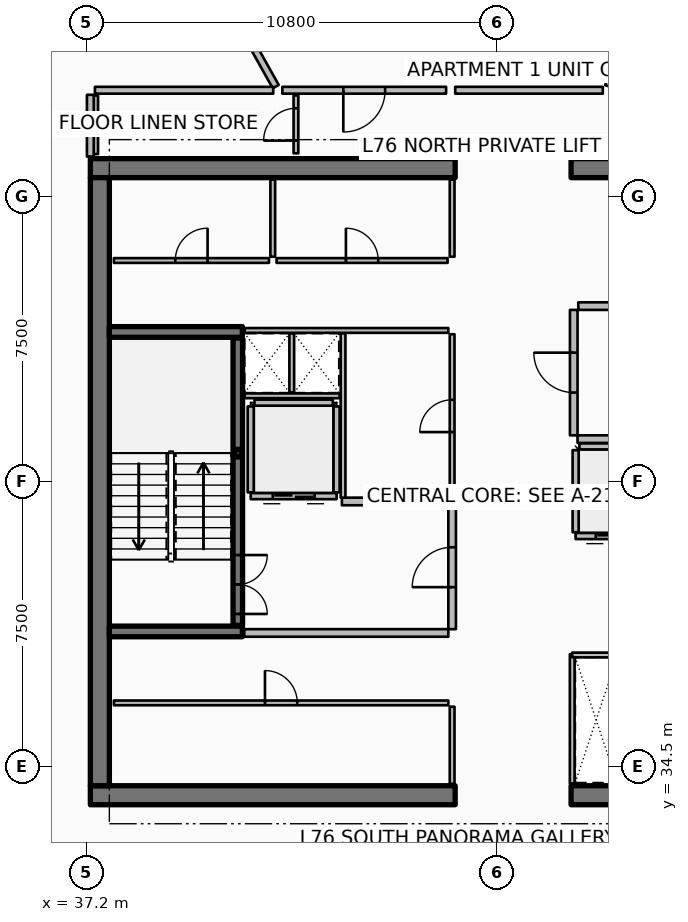
"""IFC4 building model, lengths in metres.
Left out: names, types, materials, properties, quantities, classifications, styles, units other than length and angle.
Written with IfcOpenShell. Run it as: python <this file> out.ifc"""

import sys

from ifc_helpers import new_model, si_unit, direction, frame, frame_2d, origin, origin_2d, place, context, subcontext, project, spatial, rectangle, hollow_rectangle, extrude, element, fill, save


model = new_model("IFC4")
c1 = context("Model", 3, precision=1e-05, world=origin(), true_north=direction((0.0, 1.0)))
c2 = subcontext(c1, "Body", "Model", "MODEL_VIEW")
j1 = project(units=[si_unit("LENGTHUNIT", "METRE"), si_unit("PLANEANGLEUNIT", "RADIAN")], contexts=[c1])
p1 = place(None, origin())
s1 = spatial("IfcSite", under=j1, at=p1, CompositionType="ELEMENT")
p2 = place(p1, origin())
s2 = spatial("IfcBuilding", under=s1, at=p2, CompositionType="ELEMENT")
p3 = place(p2, frame((0.0, 0.0, 302.15)))
s3 = spatial("IfcBuildingStorey", under=s2, at=p3, CompositionType="ELEMENT", Elevation=302.15)
p4 = place(p3, frame((37.3, 33.75, 0.0), z_axis=(0.0, 0.0, 1.0), x_axis=(1.0, 0.0, 0.0)))
e1 = element("IfcWall", 1, at=p4, inside=s3, PredefinedType="SHEAR", context=c2, shape_type="SweptSolid", body=[
    extrude(rectangle(XDim=9.6, YDim=0.5, at=frame_2d((4.8, 0.0))), origin(), (0.0, 0.0, 1.0), 3.85),
])
p5 = place(p3, frame((49.95, 33.75, 0.0), z_axis=(0.0, 0.0, 1.0), x_axis=(1.0, 0.0, 0.0)))
e2 = element("IfcWall", 2, at=p5, inside=s3, PredefinedType="SHEAR", context=c2, shape_type="SweptSolid", body=[
    extrude(rectangle(XDim=9.6, YDim=0.5, at=frame_2d((4.8, 0.0))), origin(), (0.0, 0.0, 1.0), 3.85),
])
p6 = place(p3, frame((37.3, 50.25, 0.0), z_axis=(0.0, 0.0, 1.0), x_axis=(1.0, 0.0, 0.0)))
e3 = element("IfcWall", 3, at=p6, inside=s3, PredefinedType="SHEAR", context=c2, shape_type="SweptSolid", body=[
    extrude(rectangle(XDim=9.6, YDim=0.5, at=frame_2d((4.8, 0.0))), origin(), (0.0, 0.0, 1.0), 3.85),
])
p7 = place(p3, frame((49.95, 50.25, 0.0), z_axis=(0.0, 0.0, 1.0), x_axis=(1.0, 0.0, 0.0)))
e4 = element("IfcWall", 4, at=p7, inside=s3, PredefinedType="SHEAR", context=c2, shape_type="SweptSolid", body=[
    extrude(rectangle(XDim=9.6, YDim=0.5, at=frame_2d((4.8, 0.0))), origin(), (0.0, 0.0, 1.0), 3.85),
])
p8 = place(p3, frame((37.55, 34.0, 0.0), z_axis=(0.0, 0.0, 1.0), x_axis=(0.0, 1.0, 0.0)))
e5 = element("IfcWall", 5, at=p8, inside=s3, PredefinedType="SHEAR", context=c2, shape_type="SweptSolid", body=[
    extrude(rectangle(XDim=16.0, YDim=0.5, at=frame_2d((8.0, 0.0))), origin(), (0.0, 0.0, 1.0), 3.85),
])
for number, where, z_axis, x_axis in (
    (6, (37.8, 38.06, 0.0), (0.0, 0.0, 1.0), (1.0, 0.0, 0.0)),
    (7, (37.8, 45.94, 0.0), (0.0, 0.0, 1.0), (1.0, 0.0, 0.0)),
):
    element("IfcWall", number, at=place(p3, frame(where, z_axis=z_axis, x_axis=x_axis)), inside=s3, PredefinedType="SHEAR", context=c2, shape_type="SweptSolid", body=[
        extrude(rectangle(XDim=3.5, YDim=0.28, at=frame_2d((1.75, 0.0))), origin(), (0.0, 0.0, 1.0), 3.85),
    ])
p9 = place(p3, frame((41.18, 42.75, 0.0), z_axis=(0.0, 0.0, 1.0), x_axis=(1.0, 0.0, 0.0)))
e8 = element("IfcColumn", 8, at=p9, inside=s3, PredefinedType="COLUMN", context=c2, shape_type="SweptSolid", body=[
    extrude(hollow_rectangle(XDim=0.2, YDim=0.2, WallThickness=0.01, InnerFilletRadius=0.01, OuterFilletRadius=0.02, at=origin_2d()), origin(), (0.0, 0.0, 1.0), 1.72),
])
p10 = place(p3, frame((41.18, 38.22, 0.0), z_axis=(0.0, 0.0, 1.0), x_axis=(0.0, 1.0, 0.0)))
e9 = element("IfcWall", 9, at=p10, inside=s3, PredefinedType="SOLIDWALL", context=c2, shape_type="SweptSolid", body=[
    extrude(rectangle(XDim=7.56, YDim=0.25, at=frame_2d((3.78, 0.0))), origin(), (0.0, 0.0, 1.0), 3.45),
])
p11 = place(p10, frame((0.3, 0.0, 0.0)))
e10 = element("IfcOpeningElement", 10, at=p11, cuts=e9, PredefinedType="OPENING", context=c2, shape_type="SweptSolid", body=[
    extrude(rectangle(XDim=1.55, YDim=2.15, at=frame_2d((0.775, 1.075))), frame((0.0, 0.135, 0.0), z_axis=(0.0, -1.0, 0.0), x_axis=(1.0, 0.0, 0.0)), (0.0, 0.0, 1.0), 0.27),
])
p12 = place(p3, frame((43.78, 41.62, 0.0), z_axis=(0.0, 0.0, 1.0), x_axis=(-1.0, 0.0, 0.0)))
e11 = element("IfcWall", 11, at=p12, inside=s3, PredefinedType="PARTITIONING", context=c2, shape_type="SweptSolid", body=[
    extrude(rectangle(XDim=2.26, YDim=0.16, at=frame_2d((1.13, 0.0))), origin(), (0.0, 0.0, 1.0), 3.45),
])
p13 = place(p12, frame((0.58, 0.0, 0.0)))
e12 = element("IfcOpeningElement", 12, at=p13, cuts=e11, PredefinedType="OPENING", context=c2, shape_type="SweptSolid", body=[
    extrude(rectangle(XDim=1.1, YDim=2.1, at=frame_2d((0.55, 1.05))), frame((0.0, 0.09, 0.0), z_axis=(0.0, -1.0, 0.0), x_axis=(1.0, 0.0, 0.0)), (0.0, 0.0, 1.0), 0.18),
])
for number, where, z_axis, x_axis in (
    (13, (43.78, 41.72, 0.0), (0.0, 0.0, 1.0), (0.0, 1.0, 0.0)),
    (14, (41.52, 41.72, 0.0), (0.0, 0.0, 1.0), (0.0, 1.0, 0.0)),
):
    element("IfcWall", number, at=place(p3, frame(where, z_axis=z_axis, x_axis=x_axis)), inside=s3, PredefinedType="PARTITIONING", context=c2, shape_type="SweptSolid", body=[
        extrude(rectangle(XDim=2.26, YDim=0.16, at=frame_2d((1.13, 0.0))), origin(), (0.0, 0.0, 1.0), 3.45),
    ])
p14 = place(p3, frame((41.62, 44.08, 0.0), z_axis=(0.0, 0.0, 1.0), x_axis=(1.0, 0.0, 0.0)))
e15 = element("IfcWall", 15, at=p14, inside=s3, PredefinedType="PARTITIONING", context=c2, shape_type="SweptSolid", body=[
    extrude(rectangle(XDim=2.06, YDim=0.16, at=frame_2d((1.03, 0.0))), origin(), (0.0, 0.0, 1.0), 3.45),
])
p15 = place(p3, frame((52.23, 40.57, 0.0), z_axis=(0.0, 0.0, 1.0), x_axis=(-1.0, 0.0, 0.0)))
e16 = element("IfcWall", 16, at=p15, inside=s3, PredefinedType="PARTITIONING", context=c2, shape_type="SweptSolid", body=[
    extrude(rectangle(XDim=2.16, YDim=0.16, at=frame_2d((1.08, 0.0))), origin(), (0.0, 0.0, 1.0), 3.45),
])
p16 = place(p15, frame((0.53, 0.0, 0.0)))
e17 = element("IfcOpeningElement", 17, at=p16, cuts=e16, PredefinedType="OPENING", context=c2, shape_type="SweptSolid", body=[
    extrude(rectangle(XDim=1.1, YDim=2.1, at=frame_2d((0.55, 1.05))), frame((0.0, 0.09, 0.0), z_axis=(0.0, -1.0, 0.0), x_axis=(1.0, 0.0, 0.0)), (0.0, 0.0, 1.0), 0.18),
])
p17 = place(p3, frame((50.07, 40.67, 0.0), z_axis=(0.0, 0.0, 1.0), x_axis=(0.0, 1.0, 0.0)))
e18 = element("IfcWall", 18, at=p17, inside=s3, PredefinedType="PARTITIONING", context=c2, shape_type="SweptSolid", body=[
    extrude(rectangle(XDim=2.16, YDim=0.16, at=frame_2d((1.08, 0.0))), origin(), (0.0, 0.0, 1.0), 3.45),
])
p18 = place(p3, frame((50.17, 42.93, 0.0), z_axis=(0.0, 0.0, 1.0), x_axis=(1.0, 0.0, 0.0)))
e19 = element("IfcWall", 19, at=p18, inside=s3, PredefinedType="PARTITIONING", context=c2, shape_type="SweptSolid", body=[
    extrude(rectangle(XDim=1.96, YDim=0.16, at=frame_2d((0.98, 0.0))), origin(), (0.0, 0.0, 1.0), 3.45),
])
p19 = place(p3, frame((46.82, 34.05, 0.0), z_axis=(0.0, 0.0, 1.0), x_axis=(0.0, 1.0, 0.0)))
e20 = element("IfcWall", 20, at=p19, inside=s3, PredefinedType="PARTITIONING", context=c2, shape_type="SweptSolid", body=[
    extrude(rectangle(XDim=2.03, YDim=0.125, at=frame_2d((1.015, 0.0))), origin(), (0.0, 0.0, 1.0), 2.89),
])
p20 = place(p3, frame((37.92, 36.18, 0.0), z_axis=(0.0, 0.0, 1.0), x_axis=(1.0, 0.0, 0.0)))
e21 = element("IfcWall", 21, at=p20, inside=s3, PredefinedType="PARTITIONING", context=c2, shape_type="SweptSolid", body=[
    extrude(rectangle(XDim=8.8, YDim=0.125, at=frame_2d((4.4, 0.0))), origin(), (0.0, 0.0, 1.0), 2.89),
])
p21 = place(p20, frame((3.975, 0.0, 0.0)))
e22 = element("IfcOpeningElement", 22, at=p21, cuts=e21, PredefinedType="OPENING", context=c2, shape_type="SweptSolid", body=[
    extrude(rectangle(XDim=0.85, YDim=2.06, at=frame_2d((0.425, 1.03))), frame((0.0, 0.073, 0.0), z_axis=(0.0, -1.0, 0.0), x_axis=(1.0, 0.0, 0.0)), (0.0, 0.0, 1.0), 0.145),
])
for number, where, z_axis, x_axis in (
    (23, (46.82, 47.92, 0.0), (0.0, 0.0, 1.0), (0.0, 1.0, 0.0)),
    (24, (42.1, 47.92, 0.0), (0.0, 0.0, 1.0), (0.0, 1.0, 0.0)),
):
    element("IfcWall", number, at=place(p3, frame(where, z_axis=z_axis, x_axis=x_axis)), inside=s3, PredefinedType="PARTITIONING", context=c2, shape_type="SweptSolid", body=[
        extrude(rectangle(XDim=2.03, YDim=0.125, at=frame_2d((1.015, 0.0))), origin(), (0.0, 0.0, 1.0), 2.89),
    ])
p22 = place(p3, frame((37.92, 47.82, 0.0), z_axis=(0.0, 0.0, 1.0), x_axis=(1.0, 0.0, 0.0)))
e25 = element("IfcWall", 25, at=p22, inside=s3, PredefinedType="PARTITIONING", context=c2, shape_type="SweptSolid", body=[
    extrude(rectangle(XDim=4.08, YDim=0.125, at=frame_2d((2.04, 0.0))), origin(), (0.0, 0.0, 1.0), 2.89),
])
p23 = place(p22, frame((1.615, 0.0, 0.0)))
e26 = element("IfcOpeningElement", 26, at=p23, cuts=e25, PredefinedType="OPENING", context=c2, shape_type="SweptSolid", body=[
    extrude(rectangle(XDim=0.85, YDim=2.06, at=frame_2d((0.425, 1.03))), frame((0.0, 0.073, 0.0), z_axis=(0.0, -1.0, 0.0), x_axis=(1.0, 0.0, 0.0)), (0.0, 0.0, 1.0), 0.145),
])
p24 = place(p3, frame((42.2, 47.82, 0.0), z_axis=(0.0, 0.0, 1.0), x_axis=(1.0, 0.0, 0.0)))
e27 = element("IfcWall", 27, at=p24, inside=s3, PredefinedType="PARTITIONING", context=c2, shape_type="SweptSolid", body=[
    extrude(rectangle(XDim=4.5, YDim=0.125, at=frame_2d((2.25, 0.0))), origin(), (0.0, 0.0, 1.0), 2.89),
])
p25 = place(p24, frame((1.825, 0.0, 0.0)))
e28 = element("IfcOpeningElement", 28, at=p25, cuts=e27, PredefinedType="OPENING", context=c2, shape_type="SweptSolid", body=[
    extrude(rectangle(XDim=0.85, YDim=2.06, at=frame_2d((0.425, 1.03))), frame((0.0, 0.073, 0.0), z_axis=(0.0, -1.0, 0.0), x_axis=(1.0, 0.0, 0.0)), (0.0, 0.0, 1.0), 0.145),
])
p26 = place(p3, frame((41.35, 38.02, 0.0), z_axis=(0.0, 0.0, 1.0), x_axis=(1.0, 0.0, 0.0)))
e29 = element("IfcWall", 29, at=p26, inside=s3, PredefinedType="PARTITIONING", context=c2, shape_type="SweptSolid", body=[
    extrude(rectangle(XDim=5.37, YDim=0.2, at=frame_2d((2.685, 0.0))), origin(), (0.0, 0.0, 1.0), 3.45),
])
p27 = place(p3, frame((43.92, 41.48, 0.0), z_axis=(0.0, 0.0, 1.0), x_axis=(1.0, 0.0, 0.0)))
e30 = element("IfcWall", 30, at=p27, inside=s3, PredefinedType="PARTITIONING", context=c2, shape_type="SweptSolid", body=[
    extrude(rectangle(XDim=2.8, YDim=0.2, at=frame_2d((1.4, 0.0))), origin(), (0.0, 0.0, 1.0), 3.45),
])
p28 = place(p3, frame((46.82, 38.12, 0.0), z_axis=(0.0, 0.0, 1.0), x_axis=(0.0, 1.0, 0.0)))
e31 = element("IfcWall", 31, at=p28, inside=s3, PredefinedType="PARTITIONING", context=c2, shape_type="SweptSolid", body=[
    extrude(rectangle(XDim=3.26, YDim=0.2, at=frame_2d((1.63, 0.0))), origin(), (0.0, 0.0, 1.0), 3.45),
])
p29 = place(p28, frame((1.105, 0.0, 0.0)))
e32 = element("IfcOpeningElement", 32, at=p29, cuts=e31, PredefinedType="OPENING", context=c2, shape_type="SweptSolid", body=[
    extrude(rectangle(XDim=1.05, YDim=2.1, at=frame_2d((0.525, 1.05))), frame((0.0, 0.11, 0.0), z_axis=(0.0, -1.0, 0.0), x_axis=(1.0, 0.0, 0.0)), (0.0, 0.0, 1.0), 0.22),
])
p30 = place(p3, frame((50.12, 43.12, 0.0), z_axis=(0.0, 0.0, 1.0), x_axis=(1.0, 0.0, 0.0)))
e33 = element("IfcWall", 33, at=p30, inside=s3, PredefinedType="PARTITIONING", context=c2, shape_type="SweptSolid", body=[
    extrude(rectangle(XDim=8.88, YDim=0.2, at=frame_2d((4.44, 0.0))), origin(), (0.0, 0.0, 1.0), 3.45),
])
p31 = place(p3, frame((50.14, 46.62, 0.0), z_axis=(0.0, 0.0, 1.0), x_axis=(1.0, 0.0, 0.0)))
e34 = element("IfcWall", 34, at=p31, inside=s3, PredefinedType="PARTITIONING", context=c2, shape_type="SweptSolid", body=[
    extrude(rectangle(XDim=1.02, YDim=0.2, at=frame_2d((0.51, 0.0))), origin(), (0.0, 0.0, 1.0), 3.45),
])
p32 = place(p3, frame((50.02, 43.22, 0.0), z_axis=(0.0, 0.0, 1.0), x_axis=(0.0, 1.0, 0.0)))
e35 = element("IfcWall", 35, at=p32, inside=s3, PredefinedType="PARTITIONING", context=c2, shape_type="SweptSolid", body=[
    extrude(rectangle(XDim=3.3, YDim=0.2, at=frame_2d((1.65, 0.0))), origin(), (0.0, 0.0, 1.0), 3.45),
])
p33 = place(p32, frame((1.125, 0.0, 0.0)))
e36 = element("IfcOpeningElement", 36, at=p33, cuts=e35, PredefinedType="OPENING", context=c2, shape_type="SweptSolid", body=[
    extrude(rectangle(XDim=1.05, YDim=2.1, at=frame_2d((0.525, 1.05))), frame((0.0, 0.11, 0.0), z_axis=(0.0, -1.0, 0.0), x_axis=(1.0, 0.0, 0.0)), (0.0, 0.0, 1.0), 0.22),
])
p34 = place(p3, frame((41.36, 45.98, 0.0), z_axis=(0.0, 0.0, 1.0), x_axis=(1.0, 0.0, 0.0)))
e37 = element("IfcWall", 37, at=p34, inside=s3, PredefinedType="PARTITIONING", context=c2, shape_type="SweptSolid", body=[
    extrude(rectangle(XDim=5.36, YDim=0.125, at=frame_2d((2.68, 0.0))), origin(), (0.0, 0.0, 1.0), 2.89),
])
p35 = place(p3, frame((41.36, 44.26, 0.0), z_axis=(0.0, 0.0, 1.0), x_axis=(1.0, 0.0, 0.0)))
e38 = element("IfcWall", 38, at=p35, inside=s3, PredefinedType="PARTITIONING", context=c2, shape_type="SweptSolid", body=[
    extrude(rectangle(XDim=2.5, YDim=0.125, at=frame_2d((1.25, 0.0))), origin(), (0.0, 0.0, 1.0), 2.89),
])
p36 = place(p3, frame((42.6, 44.35, 0.0), z_axis=(0.0, 0.0, 1.0), x_axis=(0.0, 1.0, 0.0)))
e39 = element("IfcWall", 39, at=p36, inside=s3, PredefinedType="PARTITIONING", context=c2, shape_type="SweptSolid", body=[
    extrude(rectangle(XDim=1.55, YDim=0.125, at=frame_2d((0.775, 0.0))), origin(), (0.0, 0.0, 1.0), 2.89),
])
p37 = place(p3, frame((49.98, 34.06, 0.0), z_axis=(0.0, 0.0, 1.0), x_axis=(0.0, 1.0, 0.0)))
e40 = element("IfcWall", 40, at=p37, inside=s3, PredefinedType="PARTITIONING", context=c2, shape_type="SweptSolid", body=[
    extrude(rectangle(XDim=3.4, YDim=0.125, at=frame_2d((1.7, 0.0))), origin(), (0.0, 0.0, 1.0), 2.89),
])
p38 = place(p3, frame((49.98, 37.44, 0.0), z_axis=(0.0, 0.0, 1.0), x_axis=(1.0, 0.0, 0.0)))
e41 = element("IfcWall", 41, at=p38, inside=s3, PredefinedType="PARTITIONING", context=c2, shape_type="SweptSolid", body=[
    extrude(rectangle(XDim=1.26, YDim=0.125, at=frame_2d((0.63, 0.0))), origin(), (0.0, 0.0, 1.0), 2.89),
])
p39 = place(p3, frame((43.95, 41.58, 0.0), z_axis=(0.0, 0.0, 1.0), x_axis=(0.0, 1.0, 0.0)))
e42 = element("IfcWall", 42, at=p39, inside=s3, PredefinedType="PARTITIONING", context=c2, shape_type="SweptSolid", body=[
    extrude(rectangle(XDim=4.32, YDim=0.125, at=frame_2d((2.16, 0.0))), origin(), (0.0, 0.0, 1.0), 2.89),
])
p40 = place(p3, frame((46.82, 41.58, 0.0), z_axis=(0.0, 0.0, 1.0), x_axis=(0.0, 1.0, 0.0)))
e43 = element("IfcWall", 43, at=p40, inside=s3, PredefinedType="PARTITIONING", context=c2, shape_type="SweptSolid", body=[
    extrude(rectangle(XDim=4.3, YDim=0.125, at=frame_2d((2.15, 0.0))), origin(), (0.0, 0.0, 1.0), 2.89),
])
p41 = place(p40, frame((1.725, 0.0, 0.0)))
e44 = element("IfcOpeningElement", 44, at=p41, cuts=e43, PredefinedType="OPENING", context=c2, shape_type="SweptSolid", body=[
    extrude(rectangle(XDim=0.85, YDim=2.06, at=frame_2d((0.425, 1.03))), frame((0.0, 0.073, 0.0), z_axis=(0.0, -1.0, 0.0), x_axis=(1.0, 0.0, 0.0)), (0.0, 0.0, 1.0), 0.145),
])
p42 = place(p3, frame((37.44, 50.62, 0.0), z_axis=(0.0, 0.0, 1.0), x_axis=(0.0, 1.0, 0.0)))
e45 = element("IfcWall", 45, at=p42, inside=s3, PredefinedType="PARTITIONING", context=c2, shape_type="SweptSolid", body=[
    extrude(rectangle(XDim=1.54, YDim=0.125, at=frame_2d((0.77, 0.0))), origin(), (0.0, 0.0, 1.0), 2.407),
])
p43 = place(p3, frame((42.71, 50.64, 0.0), z_axis=(0.0, 0.0, 1.0), x_axis=(0.0, 1.0, 0.0)))
e46 = element("IfcWall", 46, at=p43, inside=s3, PredefinedType="PARTITIONING", context=c2, shape_type="SweptSolid", body=[
    extrude(rectangle(XDim=1.52, YDim=0.125, at=frame_2d((0.76, 0.0))), origin(), (0.0, 0.0, 1.0), 2.407),
])
p44 = place(p43, frame((0.335, 0.0, 0.0)))
e47 = element("IfcOpeningElement", 47, at=p44, cuts=e46, PredefinedType="OPENING", context=c2, shape_type="SweptSolid", body=[
    extrude(rectangle(XDim=0.85, YDim=2.06, at=frame_2d((0.425, 1.03))), frame((0.0, 0.073, 0.0), z_axis=(0.0, -1.0, 0.0), x_axis=(1.0, 0.0, 0.0)), (0.0, 0.0, 1.0), 0.145),
])
p45 = place(p3, frame((50.935, 52.406, 0.0), z_axis=(0.0, 0.0, 1.0), x_axis=(0.27143972755, 0.962455440167, 0.0)))
e48 = element("IfcWall", 48, at=p45, inside=s3, PredefinedType="PARTITIONING", context=c2, shape_type="SweptSolid", body=[
    extrude(rectangle(XDim=16.173, YDim=0.18, at=frame_2d((8.086, 0.0))), origin(), (0.0, 0.0, 1.0), 2.407),
])
p46 = place(p3, frame((42.178, 52.396, 0.0), z_axis=(0.0, 0.0, 1.0), x_axis=(-0.48862858053, 0.872491896976, 0.0)))
e49 = element("IfcWall", 49, at=p46, inside=s3, PredefinedType="PARTITIONING", context=c2, shape_type="SweptSolid", body=[
    extrude(rectangle(XDim=12.679, YDim=0.18, at=frame_2d((6.34, 0.0))), origin(), (0.0, 0.0, 1.0), 2.407),
])
p47 = place(p3, frame((46.661, 52.3, 0.0), z_axis=(0.0, 0.0, 1.0), x_axis=(-1.0, 0.0, 0.0)))
e50 = element("IfcWall", 50, at=p47, inside=s3, PredefinedType="PARTITIONING", context=c2, shape_type="SweptSolid", body=[
    extrude(rectangle(XDim=4.309, YDim=0.18, at=frame_2d((2.155, 0.0))), origin(), (0.0, 0.0, 1.0), 2.407),
])
p48 = place(p47, frame((1.604, 0.0, 0.0)))
e51 = element("IfcOpeningElement", 51, at=p48, cuts=e50, PredefinedType="OPENING", context=c2, shape_type="SweptSolid", body=[
    extrude(rectangle(XDim=1.1, YDim=2.1, at=frame_2d((0.55, 1.05))), frame((0.0, 0.1, 0.0), z_axis=(0.0, -1.0, 0.0), x_axis=(1.0, 0.0, 0.0)), (0.0, 0.0, 1.0), 0.2),
])
p49 = place(p3, frame((50.785, 52.3, 0.0), z_axis=(0.0, 0.0, 1.0), x_axis=(-1.0, 0.0, 0.0)))
e52 = element("IfcWall", 52, at=p49, inside=s3, PredefinedType="PARTITIONING", context=c2, shape_type="SweptSolid", body=[
    extrude(rectangle(XDim=3.884, YDim=0.18, at=frame_2d((1.942, 0.0))), origin(), (0.0, 0.0, 1.0), 2.407),
])
p50 = place(p3, frame((42.112, 52.3, 0.0), z_axis=(0.0, 0.0, 1.0), x_axis=(-1.0, 0.0, 0.0)))
e53 = element("IfcWall", 53, at=p50, inside=s3, PredefinedType="PARTITIONING", context=c2, shape_type="SweptSolid", body=[
    extrude(rectangle(XDim=4.692, YDim=0.18, at=frame_2d((2.346, 0.0))), origin(), (0.0, 0.0, 1.0), 2.407),
])
p51 = place(p3, frame((37.3, 52.18, 0.0), z_axis=(0.0, 0.0, 1.0), x_axis=(0.0, -1.0, 0.0)))
e54 = element("IfcWall", 54, at=p51, inside=s3, PredefinedType="PARTITIONING", context=c2, shape_type="SweptSolid", body=[
    extrude(rectangle(XDim=1.625, YDim=0.18, at=frame_2d((0.812, 0.0))), origin(), (0.0, 0.0, 1.0), 2.407),
])
p52 = place(p11, origin())
e55 = element("IfcDoor", 55, at=p52, inside=s3, OperationType="DOUBLE_DOOR_SINGLE_SWING", PredefinedType="DOOR", context=c2, shape_type="SweptSolid", body=[
    extrude(rectangle(XDim=1.55, YDim=2.15, at=frame_2d((0.775, 1.075))), frame((0.0, 0.025, 0.0), z_axis=(0.0, -1.0, 0.0), x_axis=(1.0, 0.0, 0.0)), (0.0, 0.0, 1.0), 0.05),
])
fill(e10, e55)
p53 = place(p13, origin())
e56 = element("IfcDoor", 56, at=p53, inside=s3, OperationType="DOUBLE_DOOR_SLIDING", PredefinedType="DOOR", context=c2, shape_type="SweptSolid", body=[
    extrude(rectangle(XDim=1.1, YDim=2.1, at=frame_2d((0.55, 1.05))), frame((0.0, 0.025, 0.0), z_axis=(0.0, -1.0, 0.0), x_axis=(1.0, 0.0, 0.0)), (0.0, 0.0, 1.0), 0.05),
])
fill(e12, e56)
p54 = place(p16, origin())
e57 = element("IfcDoor", 57, at=p54, inside=s3, OperationType="DOUBLE_DOOR_SLIDING", PredefinedType="DOOR", context=c2, shape_type="SweptSolid", body=[
    extrude(rectangle(XDim=1.1, YDim=2.1, at=frame_2d((0.55, 1.05))), frame((0.0, 0.025, 0.0), z_axis=(0.0, -1.0, 0.0), x_axis=(1.0, 0.0, 0.0)), (0.0, 0.0, 1.0), 0.05),
])
fill(e17, e57)
p55 = place(p21, origin())
e58 = element("IfcDoor", 58, at=p55, inside=s3, OperationType="SINGLE_SWING_LEFT", PredefinedType="DOOR", context=c2, shape_type="SweptSolid", body=[
    extrude(rectangle(XDim=0.85, YDim=2.06, at=frame_2d((0.425, 1.03))), frame((0.0, 0.025, 0.0), z_axis=(0.0, -1.0, 0.0), x_axis=(1.0, 0.0, 0.0)), (0.0, 0.0, 1.0), 0.05),
])
fill(e22, e58)
p56 = place(p23, origin())
e59 = element("IfcDoor", 59, at=p56, inside=s3, OperationType="SINGLE_SWING_RIGHT", PredefinedType="DOOR", context=c2, shape_type="SweptSolid", body=[
    extrude(rectangle(XDim=0.85, YDim=2.06, at=frame_2d((0.425, 1.03))), frame((0.0, 0.025, 0.0), z_axis=(0.0, -1.0, 0.0), x_axis=(1.0, 0.0, 0.0)), (0.0, 0.0, 1.0), 0.05),
])
fill(e26, e59)
p57 = place(p25, origin())
e60 = element("IfcDoor", 60, at=p57, inside=s3, OperationType="SINGLE_SWING_LEFT", PredefinedType="DOOR", context=c2, shape_type="SweptSolid", body=[
    extrude(rectangle(XDim=0.85, YDim=2.06, at=frame_2d((0.425, 1.03))), frame((0.0, 0.025, 0.0), z_axis=(0.0, -1.0, 0.0), x_axis=(1.0, 0.0, 0.0)), (0.0, 0.0, 1.0), 0.05),
])
fill(e28, e60)
p58 = place(p29, origin())
e61 = element("IfcDoor", 61, at=p58, inside=s3, OperationType="SINGLE_SWING_LEFT", PredefinedType="DOOR", context=c2, shape_type="SweptSolid", body=[
    extrude(rectangle(XDim=1.05, YDim=2.1, at=frame_2d((0.525, 1.05))), frame((0.0, 0.025, 0.0), z_axis=(0.0, -1.0, 0.0), x_axis=(1.0, 0.0, 0.0)), (0.0, 0.0, 1.0), 0.05),
])
fill(e32, e61)
p59 = place(p33, origin())
e62 = element("IfcDoor", 62, at=p59, inside=s3, OperationType="SINGLE_SWING_RIGHT", PredefinedType="DOOR", context=c2, shape_type="SweptSolid", body=[
    extrude(rectangle(XDim=1.05, YDim=2.1, at=frame_2d((0.525, 1.05))), frame((0.0, 0.025, 0.0), z_axis=(0.0, -1.0, 0.0), x_axis=(1.0, 0.0, 0.0)), (0.0, 0.0, 1.0), 0.05),
])
fill(e36, e62)
p60 = place(p41, origin())
e63 = element("IfcDoor", 63, at=p60, inside=s3, OperationType="SINGLE_SWING_LEFT", PredefinedType="DOOR", context=c2, shape_type="SweptSolid", body=[
    extrude(rectangle(XDim=0.85, YDim=2.06, at=frame_2d((0.425, 1.03))), frame((0.0, 0.025, 0.0), z_axis=(0.0, -1.0, 0.0), x_axis=(1.0, 0.0, 0.0)), (0.0, 0.0, 1.0), 0.05),
])
fill(e44, e63)
p61 = place(p44, origin())
e64 = element("IfcDoor", 64, at=p61, inside=s3, OperationType="SINGLE_SWING_LEFT", PredefinedType="DOOR", context=c2, shape_type="SweptSolid", body=[
    extrude(rectangle(XDim=0.85, YDim=2.06, at=frame_2d((0.425, 1.03))), frame((0.0, 0.025, 0.0), z_axis=(0.0, -1.0, 0.0), x_axis=(1.0, 0.0, 0.0)), (0.0, 0.0, 1.0), 0.05),
])
fill(e47, e64)
p62 = place(p48, origin())
e65 = element("IfcDoor", 65, at=p62, inside=s3, OperationType="SINGLE_SWING_RIGHT", PredefinedType="DOOR", context=c2, shape_type="SweptSolid", body=[
    extrude(rectangle(XDim=1.1, YDim=2.1, at=frame_2d((0.55, 1.05))), frame((0.0, 0.025, 0.0), z_axis=(0.0, -1.0, 0.0), x_axis=(1.0, 0.0, 0.0)), (0.0, 0.0, 1.0), 0.05),
])
fill(e51, e65)
save(model, sys.argv[1])
